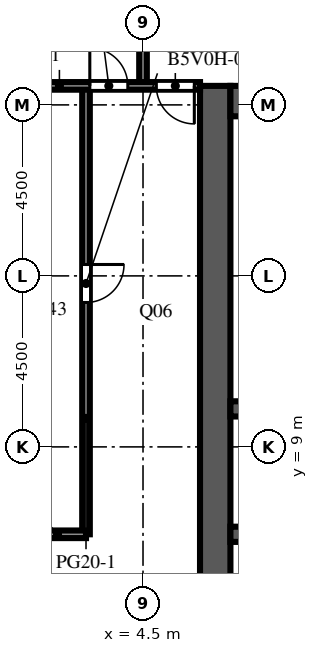
"""IFC4 building model, lengths in metres.
Left out: names, types, materials, properties, quantities, classifications, styles, units other than length and angle.
Written with IfcOpenShell. Run it as: python <this file> out.ifc"""

import sys

from ifc_helpers import new_model, si_unit, direction, frame, frame_2d, origin, place, context, subcontext, project, spatial, rectangle, extrude, element, fill, save


model = new_model("IFC4")
c1 = context("Model", 3, precision=1e-05, world=origin(), true_north=direction((0.0, 1.0)))
c2 = subcontext(c1, "Body", "Model", "MODEL_VIEW")
j1 = project(units=[si_unit("LENGTHUNIT", "METRE"), si_unit("PLANEANGLEUNIT", "RADIAN")], contexts=[c1])
p1 = place(None, origin())
s1 = spatial("IfcSite", under=j1, at=p1, CompositionType="ELEMENT")
p2 = place(p1, origin())
s2 = spatial("IfcBuilding", under=s1, at=p2, CompositionType="ELEMENT")
p3 = place(p2, frame((0.0, 0.0, 156.8)))
s3 = spatial("IfcBuildingStorey", under=s2, at=p3, CompositionType="ELEMENT", Elevation=156.8)
p4 = place(p3, frame((6.4, -9.0, 0.0), z_axis=(0.0, 0.0, 1.0), x_axis=(0.0, 1.0, 0.0)))
e1 = element("IfcWall", 1, at=p4, inside=s3, PredefinedType="SHEAR", context=c2, shape_type="SweptSolid", body=[
    extrude(rectangle(XDim=27.5, YDim=0.8, at=frame_2d((13.75, 0.0))), origin(), (0.0, 0.0, 1.0), 4.1),
])
p5 = place(p4, frame((12.55, 0.0, 0.0)))
e2 = element("IfcOpeningElement", 2, at=p5, cuts=e1, PredefinedType="OPENING", context=c2, shape_type="SweptSolid", body=[
    extrude(rectangle(XDim=2.4, YDim=2.4, at=frame_2d((1.2, 1.2))), frame((0.0, 0.41, 0.0), z_axis=(0.0, -1.0, 0.0), x_axis=(1.0, 0.0, 0.0)), (0.0, 0.0, 1.0), 0.82),
])
p6 = place(p4, frame((5.45, 0.0, 0.0)))
e3 = element("IfcOpeningElement", 3, at=p6, cuts=e1, PredefinedType="OPENING", context=c2, shape_type="SweptSolid", body=[
    extrude(rectangle(XDim=1.2, YDim=2.1, at=frame_2d((0.6, 1.05))), frame((0.0, 0.41, 0.0), z_axis=(0.0, -1.0, 0.0), x_axis=(1.0, 0.0, 0.0)), (0.0, 0.0, 1.0), 0.82),
])
p7 = place(p4, frame((19.45, 0.0, 0.0)))
e4 = element("IfcOpeningElement", 4, at=p7, cuts=e1, PredefinedType="OPENING", context=c2, shape_type="SweptSolid", body=[
    extrude(rectangle(XDim=1.0, YDim=2.1, at=frame_2d((0.5, 1.05))), frame((0.0, 0.41, 0.0), z_axis=(0.0, -1.0, 0.0), x_axis=(1.0, 0.0, 0.0)), (0.0, 0.0, 1.0), 0.82),
])
p8 = place(p4, frame((21.137, 0.0, 0.0)))
e5 = element("IfcOpeningElement", 5, at=p8, cuts=e1, PredefinedType="OPENING", context=c2, shape_type="SweptSolid", body=[
    extrude(rectangle(XDim=1.0, YDim=2.1, at=frame_2d((0.5, 1.05))), frame((0.0, 0.41, 0.0), z_axis=(0.0, -1.0, 0.0), x_axis=(1.0, 0.0, 0.0)), (0.0, 0.0, 1.0), 0.82),
])
p9 = place(p4, frame((23.2, 0.0, 0.0)))
e6 = element("IfcOpeningElement", 6, at=p9, cuts=e1, PredefinedType="OPENING", context=c2, shape_type="SweptSolid", body=[
    extrude(rectangle(XDim=1.0, YDim=2.1, at=frame_2d((0.5, 1.05))), frame((0.0, 0.41, 0.0), z_axis=(0.0, -1.0, 0.0), x_axis=(1.0, 0.0, 0.0)), (0.0, 0.0, 1.0), 0.82),
])
p10 = place(p4, frame((25.262, 0.0, 0.0)))
e7 = element("IfcOpeningElement", 7, at=p10, cuts=e1, PredefinedType="OPENING", context=c2, shape_type="SweptSolid", body=[
    extrude(rectangle(XDim=1.0, YDim=2.1, at=frame_2d((0.5, 1.05))), frame((0.0, 0.41, 0.0), z_axis=(0.0, -1.0, 0.0), x_axis=(1.0, 0.0, 0.0)), (0.0, 0.0, 1.0), 0.82),
])
p11 = place(p3, frame((6.8, 18.1, 0.0), z_axis=(0.0, 0.0, 1.0), x_axis=(1.0, 0.0, 0.0)))
e8 = element("IfcWall", 8, at=p11, inside=s3, PredefinedType="SHEAR", context=c2, shape_type="SweptSolid", body=[
    extrude(rectangle(XDim=10.4, YDim=0.8, at=frame_2d((5.2, 0.0))), origin(), (0.0, 0.0, 1.0), 4.1),
])
p12 = place(p3, frame((6.8, 6.7, 0.0), z_axis=(0.0, 0.0, 1.0), x_axis=(1.0, 0.0, 0.0)))
e9 = element("IfcWall", 9, at=p12, inside=s3, PredefinedType="SHEAR", context=c2, shape_type="SweptSolid", body=[
    extrude(rectangle(XDim=10.4, YDim=0.4, at=frame_2d((5.2, 0.0))), origin(), (0.0, 0.0, 1.0), 4.1),
])
p13 = place(p12, frame((3.337, 0.0, 0.0)))
e10 = element("IfcOpeningElement", 10, at=p13, cuts=e9, PredefinedType="OPENING", context=c2, shape_type="SweptSolid", body=[
    extrude(rectangle(XDim=1.1, YDim=2.1, at=frame_2d((0.55, 1.05))), frame((0.0, 0.21, 0.0), z_axis=(0.0, -1.0, 0.0), x_axis=(1.0, 0.0, 0.0)), (0.0, 0.0, 1.0), 0.42),
])
p14 = place(p12, frame((5.962, 0.0, 0.0)))
e11 = element("IfcOpeningElement", 11, at=p14, cuts=e9, PredefinedType="OPENING", context=c2, shape_type="SweptSolid", body=[
    extrude(rectangle(XDim=1.1, YDim=2.1, at=frame_2d((0.55, 1.05))), frame((0.0, 0.21, 0.0), z_axis=(0.0, -1.0, 0.0), x_axis=(1.0, 0.0, 0.0)), (0.0, 0.0, 1.0), 0.42),
])
p15 = place(p12, frame((8.663, 0.0, 0.0)))
e12 = element("IfcOpeningElement", 12, at=p15, cuts=e9, PredefinedType="OPENING", context=c2, shape_type="SweptSolid", body=[
    extrude(rectangle(XDim=1.1, YDim=2.1, at=frame_2d((0.55, 1.05))), frame((0.0, 0.21, 0.0), z_axis=(0.0, -1.0, 0.0), x_axis=(1.0, 0.0, 0.0)), (0.0, 0.0, 1.0), 0.42),
])
p16 = place(p12, frame((0.688, 0.0, 0.0)))
e13 = element("IfcOpeningElement", 13, at=p16, cuts=e9, PredefinedType="OPENING", context=c2, shape_type="SweptSolid", body=[
    extrude(rectangle(XDim=1.0, YDim=2.1, at=frame_2d((0.5, 1.05))), frame((0.0, 0.21, 0.0), z_axis=(0.0, -1.0, 0.0), x_axis=(1.0, 0.0, 0.0)), (0.0, 0.0, 1.0), 0.42),
])
p17 = place(p3, frame((6.8, 10.0, 0.0), z_axis=(0.0, 0.0, 1.0), x_axis=(1.0, 0.0, 0.0)))
e14 = element("IfcWall", 14, at=p17, inside=s3, PredefinedType="SHEAR", context=c2, shape_type="SweptSolid", body=[
    extrude(rectangle(XDim=10.4, YDim=0.4, at=frame_2d((5.2, 0.0))), origin(), (0.0, 0.0, 1.0), 4.1),
])
for number, where, z_axis, x_axis in (
    (15, (6.8, 11.7, 0.0), (0.0, 0.0, 1.0), (1.0, 0.0, 0.0)),
    (16, (6.8, 13.575, 0.0), (0.0, 0.0, 1.0), (1.0, 0.0, 0.0)),
    (17, (6.8, 15.825, 0.0), (0.0, 0.0, 1.0), (1.0, 0.0, 0.0)),
):
    element("IfcWall", number, at=place(p3, frame(where, z_axis=z_axis, x_axis=x_axis)), inside=s3, PredefinedType="PARTITIONING", context=c2, shape_type="SweptSolid", body=[
        extrude(rectangle(XDim=5.0, YDim=0.1, at=frame_2d((2.5, 0.0))), origin(), (0.0, 0.0, 1.0), 3.65),
    ])
p18 = place(p3, frame((3.0, 6.7, 0.0), z_axis=(0.0, 0.0, 1.0), x_axis=(0.0, 1.0, 0.0)))
e18 = element("IfcWall", 18, at=p18, inside=s3, PredefinedType="PARTITIONING", context=c2, shape_type="SweptSolid", body=[
    extrude(rectangle(XDim=11.8, YDim=0.2, at=frame_2d((5.9, 0.0))), origin(), (0.0, 0.0, 1.0), 3.65),
])
p19 = place(p18, frame((6.1, 0.0, 0.0)))
e19 = element("IfcOpeningElement", 19, at=p19, cuts=e18, PredefinedType="OPENING", context=c2, shape_type="SweptSolid", body=[
    extrude(rectangle(XDim=1.0, YDim=2.1, at=frame_2d((0.5, 1.05))), frame((0.0, 0.11, 0.0), z_axis=(0.0, -1.0, 0.0), x_axis=(1.0, 0.0, 0.0)), (0.0, 0.0, 1.0), 0.22),
])
p20 = place(p3, frame((4.5, 18.5, 0.0), z_axis=(0.0, 0.0, 1.0), x_axis=(0.0, 1.0, 0.0)))
e20 = element("IfcWall", 20, at=p20, inside=s3, PredefinedType="PARTITIONING", context=c2, shape_type="SweptSolid", body=[
    extrude(rectangle(XDim=8.0, YDim=0.2, at=frame_2d((4.0, 0.0))), origin(), (0.0, 0.0, 1.0), 3.65),
])
p21 = place(p3, frame((1.5, 6.7, 0.0), z_axis=(0.0, 0.0, 1.0), x_axis=(1.0, 0.0, 0.0)))
e21 = element("IfcWall", 21, at=p21, inside=s3, PredefinedType="PARTITIONING", context=c2, shape_type="SweptSolid", body=[
    extrude(rectangle(XDim=1.5, YDim=0.2, at=frame_2d((0.75, 0.0))), origin(), (0.0, 0.0, 1.0), 3.65),
])
p22 = place(p3, frame((1.5, 18.5, 0.0), z_axis=(0.0, 0.0, 1.0), x_axis=(1.0, 0.0, 0.0)))
e22 = element("IfcWall", 22, at=p22, inside=s3, PredefinedType="PARTITIONING", context=c2, shape_type="SweptSolid", body=[
    extrude(rectangle(XDim=4.5, YDim=0.2, at=frame_2d((2.25, 0.0))), origin(), (0.0, 0.0, 1.0), 3.65),
])
p23 = place(p22, frame((1.6, 0.0, 0.0)))
e23 = element("IfcOpeningElement", 23, at=p23, cuts=e22, PredefinedType="OPENING", context=c2, shape_type="SweptSolid", body=[
    extrude(rectangle(XDim=1.0, YDim=2.1, at=frame_2d((0.5, 1.05))), frame((0.0, 0.11, 0.0), z_axis=(0.0, -1.0, 0.0), x_axis=(1.0, 0.0, 0.0)), (0.0, 0.0, 1.0), 0.22),
])
p24 = place(p22, frame((3.35, 0.0, 0.0)))
e24 = element("IfcOpeningElement", 24, at=p24, cuts=e22, PredefinedType="OPENING", context=c2, shape_type="SweptSolid", body=[
    extrude(rectangle(XDim=1.0, YDim=2.1, at=frame_2d((0.5, 1.05))), frame((0.0, 0.11, 0.0), z_axis=(0.0, -1.0, 0.0), x_axis=(1.0, 0.0, 0.0)), (0.0, 0.0, 1.0), 0.22),
])
p25 = place(p5, origin())
e25 = element("IfcDoor", 25, at=p25, inside=s3, OperationType="DOUBLE_DOOR_DOUBLE_SWING", PredefinedType="DOOR", context=c2, shape_type="SweptSolid", body=[
    extrude(rectangle(XDim=2.4, YDim=2.4, at=frame_2d((1.2, 1.2))), frame((0.0, 0.025, 0.0), z_axis=(0.0, -1.0, 0.0), x_axis=(1.0, 0.0, 0.0)), (0.0, 0.0, 1.0), 0.05),
])
fill(e2, e25)
p26 = place(p7, origin())
e26 = element("IfcDoor", 26, at=p26, inside=s3, OperationType="SINGLE_SWING_RIGHT", PredefinedType="DOOR", context=c2, shape_type="SweptSolid", body=[
    extrude(rectangle(XDim=1.0, YDim=2.1, at=frame_2d((0.5, 1.05))), frame((0.0, -0.325, 0.0), z_axis=(0.0, -1.0, 0.0), x_axis=(1.0, 0.0, 0.0)), (0.0, 0.0, 1.0), 0.05),
])
fill(e4, e26)
p27 = place(p8, origin())
e27 = element("IfcDoor", 27, at=p27, inside=s3, OperationType="SINGLE_SWING_LEFT", PredefinedType="DOOR", context=c2, shape_type="SweptSolid", body=[
    extrude(rectangle(XDim=1.0, YDim=2.1, at=frame_2d((0.5, 1.05))), frame((0.0, -0.325, 0.0), z_axis=(0.0, -1.0, 0.0), x_axis=(1.0, 0.0, 0.0)), (0.0, 0.0, 1.0), 0.05),
])
fill(e5, e27)
p28 = place(p9, origin())
e28 = element("IfcDoor", 28, at=p28, inside=s3, OperationType="SINGLE_SWING_RIGHT", PredefinedType="DOOR", context=c2, shape_type="SweptSolid", body=[
    extrude(rectangle(XDim=1.0, YDim=2.1, at=frame_2d((0.5, 1.05))), frame((0.0, -0.325, 0.0), z_axis=(0.0, -1.0, 0.0), x_axis=(1.0, 0.0, 0.0)), (0.0, 0.0, 1.0), 0.05),
])
fill(e6, e28)
p29 = place(p10, origin())
e29 = element("IfcDoor", 29, at=p29, inside=s3, OperationType="SINGLE_SWING_LEFT", PredefinedType="DOOR", context=c2, shape_type="SweptSolid", body=[
    extrude(rectangle(XDim=1.0, YDim=2.1, at=frame_2d((0.5, 1.05))), frame((0.0, -0.325, 0.0), z_axis=(0.0, -1.0, 0.0), x_axis=(1.0, 0.0, 0.0)), (0.0, 0.0, 1.0), 0.05),
])
fill(e7, e29)
p30 = place(p19, origin())
e30 = element("IfcDoor", 30, at=p30, inside=s3, OperationType="SINGLE_SWING_RIGHT", PredefinedType="DOOR", context=c2, shape_type="SweptSolid", body=[
    extrude(rectangle(XDim=1.0, YDim=2.1, at=frame_2d((0.5, 1.05))), frame((0.0, 0.025, 0.0), z_axis=(0.0, -1.0, 0.0), x_axis=(1.0, 0.0, 0.0)), (0.0, 0.0, 1.0), 0.05),
])
fill(e19, e30)
p31 = place(p23, origin())
e31 = element("IfcDoor", 31, at=p31, inside=s3, OperationType="SINGLE_SWING_LEFT", PredefinedType="DOOR", context=c2, shape_type="SweptSolid", body=[
    extrude(rectangle(XDim=1.0, YDim=2.1, at=frame_2d((0.5, 1.05))), frame((0.0, 0.025, 0.0), z_axis=(0.0, -1.0, 0.0), x_axis=(1.0, 0.0, 0.0)), (0.0, 0.0, 1.0), 0.05),
])
fill(e23, e31)
p32 = place(p24, origin())
e32 = element("IfcDoor", 32, at=p32, inside=s3, OperationType="SINGLE_SWING_RIGHT", PredefinedType="DOOR", context=c2, shape_type="SweptSolid", body=[
    extrude(rectangle(XDim=1.0, YDim=2.1, at=frame_2d((0.5, 1.05))), frame((0.0, 0.025, 0.0), z_axis=(0.0, -1.0, 0.0), x_axis=(1.0, 0.0, 0.0)), (0.0, 0.0, 1.0), 0.05),
])
fill(e24, e32)
save(model, sys.argv[1])
